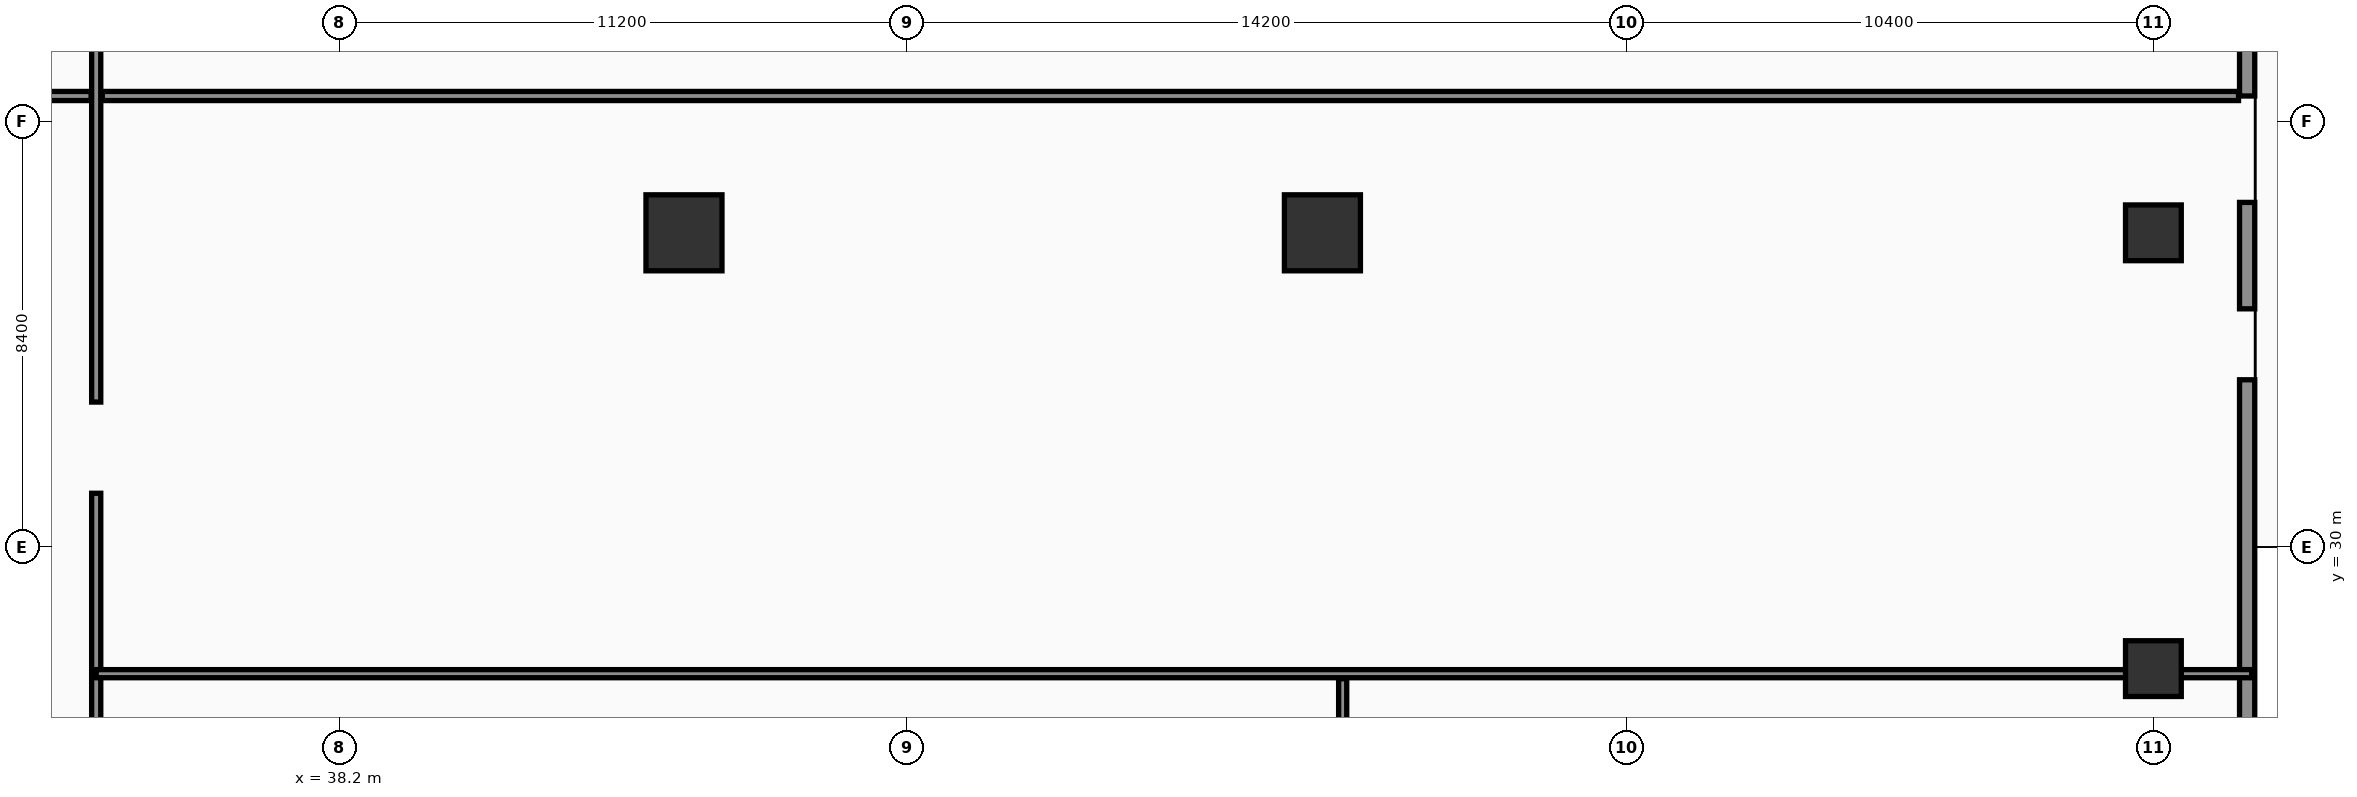
"""IFC4 building model, lengths in metres.
Left out: names, types, materials, properties, quantities, classifications, styles, units other than length and angle.
Written with IfcOpenShell. Run it as: python <this file> out.ifc"""

import sys

from ifc_helpers import new_model, si_unit, direction, frame, frame_2d, origin, origin_2d, place, context, subcontext, project, spatial, rectangle, hollow_rectangle, extrude, element, fill, save


model = new_model("IFC4")
c1 = context("Model", 3, precision=1e-05, world=origin(), true_north=direction((0.0, 1.0)))
c2 = subcontext(c1, "Body", "Model", "MODEL_VIEW")
j1 = project(units=[si_unit("LENGTHUNIT", "METRE"), si_unit("PLANEANGLEUNIT", "RADIAN")], contexts=[c1])
p1 = place(None, origin())
s1 = spatial("IfcSite", under=j1, at=p1, CompositionType="ELEMENT")
p2 = place(p1, origin())
s2 = spatial("IfcBuilding", under=s1, at=p2, CompositionType="ELEMENT")
p3 = place(p2, frame((0.0, 0.0, 17.0)))
s3 = spatial("IfcBuildingStorey", under=s2, at=p3, CompositionType="ELEMENT", Elevation=17.0)
for number, where, z_axis, x_axis in (
    (1, (74.0, 27.6, 0.0), (0.0, 0.0, 1.0), (1.0, 0.0, 0.0)),
    (2, (74.0, 36.2, 0.0), (0.0, 0.0, 1.0), (1.0, 0.0, 0.0)),
):
    element("IfcColumn", number, at=place(p3, frame(where, z_axis=z_axis, x_axis=x_axis)), inside=s3, PredefinedType="COLUMN", context=c2, shape_type="SweptSolid", body=[
        extrude(hollow_rectangle(XDim=1.1, YDim=1.1, WallThickness=0.045, at=origin_2d()), origin(), (0.0, 0.0, 1.0), 4.55),
    ])
for number, where, z_axis, x_axis in (
    (3, (45.0, 36.2, 0.0), (0.0, 0.0, 1.0), (1.0, 0.0, 0.0)),
    (4, (57.6, 36.2, 0.0), (0.0, 0.0, 1.0), (1.0, 0.0, 0.0)),
):
    element("IfcColumn", number, at=place(p3, frame(where, z_axis=z_axis, x_axis=x_axis)), inside=s3, PredefinedType="COLUMN", context=c2, shape_type="SweptSolid", body=[
        extrude(rectangle(XDim=1.5, YDim=1.5, at=origin_2d()), origin(), (0.0, 0.0, 1.0), 4.55),
    ])
p4 = place(p3, frame((75.85, 2.3, 0.0), z_axis=(0.0, 0.0, 1.0), x_axis=(0.0, 1.0, 0.0)))
e5 = element("IfcWall", 5, at=p4, inside=s3, PredefinedType="SOLIDWALL", context=c2, shape_type="SweptSolid", body=[
    extrude(rectangle(XDim=50.9, YDim=0.3, at=frame_2d((25.45, 0.0))), origin(), (0.0, 0.0, 1.0), 4.55),
])
p5 = place(p4, frame((10.0, 0.0, 0.0)))
e6 = element("IfcOpeningElement", 6, at=p5, cuts=e5, PredefinedType="OPENING", context=c2, shape_type="SweptSolid", body=[
    extrude(rectangle(XDim=1.4, YDim=2.25, at=frame_2d((0.7, 1.125))), frame((0.0, 0.16, 0.0), z_axis=(0.0, -1.0, 0.0), x_axis=(1.0, 0.0, 0.0)), (0.0, 0.0, 1.0), 0.32),
])
p6 = place(p4, frame((31.0, 0.0, 0.0)))
e7 = element("IfcOpeningElement", 7, at=p6, cuts=e5, PredefinedType="OPENING", context=c2, shape_type="SweptSolid", body=[
    extrude(rectangle(XDim=1.4, YDim=2.25, at=frame_2d((0.7, 1.125))), frame((0.0, 0.16, 0.0), z_axis=(0.0, -1.0, 0.0), x_axis=(1.0, 0.0, 0.0)), (0.0, 0.0, 1.0), 0.32),
])
p7 = place(p4, frame((16.5, 0.0, 0.85)))
e8 = element("IfcOpeningElement", 8, at=p7, cuts=e5, PredefinedType="OPENING", context=c2, shape_type="SweptSolid", body=[
    extrude(rectangle(XDim=2.1, YDim=2.1, at=frame_2d((1.05, 1.05))), frame((0.0, 0.16, 0.0), z_axis=(0.0, -1.0, 0.0), x_axis=(1.0, 0.0, 0.0)), (0.0, 0.0, 1.0), 0.32),
])
p8 = place(p4, frame((34.5, 0.0, 0.85)))
e9 = element("IfcOpeningElement", 9, at=p8, cuts=e5, PredefinedType="OPENING", context=c2, shape_type="SweptSolid", body=[
    extrude(rectangle(XDim=2.1, YDim=2.1, at=frame_2d((1.05, 1.05))), frame((0.0, 0.16, 0.0), z_axis=(0.0, -1.0, 0.0), x_axis=(1.0, 0.0, 0.0)), (0.0, 0.0, 1.0), 0.32),
])
p9 = place(p3, frame((15.2, 38.9, 0.0), z_axis=(0.0, 0.0, 1.0), x_axis=(1.0, 0.0, 0.0)))
e10 = element("IfcWall", 10, at=p9, inside=s3, PredefinedType="PARTITIONING", context=c2, shape_type="SweptSolid", body=[
    extrude(rectangle(XDim=18.1, YDim=0.18, at=frame_2d((9.05, 0.0))), origin(), (0.0, 0.0, 1.0), 3.75),
])
p10 = place(p9, frame((2.2, 0.0, 0.0)))
e11 = element("IfcOpeningElement", 11, at=p10, cuts=e10, PredefinedType="OPENING", context=c2, shape_type="SweptSolid", body=[
    extrude(rectangle(XDim=1.02, YDim=2.2, at=frame_2d((0.51, 1.1))), frame((0.0, 0.1, 0.0), z_axis=(0.0, -1.0, 0.0), x_axis=(1.0, 0.0, 0.0)), (0.0, 0.0, 1.0), 0.2),
])
p11 = place(p9, frame((8.2, 0.0, 0.0)))
e12 = element("IfcOpeningElement", 12, at=p11, cuts=e10, PredefinedType="OPENING", context=c2, shape_type="SweptSolid", body=[
    extrude(rectangle(XDim=1.02, YDim=2.2, at=frame_2d((0.51, 1.1))), frame((0.0, 0.1, 0.0), z_axis=(0.0, -1.0, 0.0), x_axis=(1.0, 0.0, 0.0)), (0.0, 0.0, 1.0), 0.2),
])
p12 = place(p9, frame((14.2, 0.0, 0.0)))
e13 = element("IfcOpeningElement", 13, at=p12, cuts=e10, PredefinedType="OPENING", context=c2, shape_type="SweptSolid", body=[
    extrude(rectangle(XDim=1.02, YDim=2.2, at=frame_2d((0.51, 1.1))), frame((0.0, 0.1, 0.0), z_axis=(0.0, -1.0, 0.0), x_axis=(1.0, 0.0, 0.0)), (0.0, 0.0, 1.0), 0.2),
])
p13 = place(p3, frame((58.0, 0.06, 0.0), z_axis=(0.0, 0.0, 1.0), x_axis=(0.0, 1.0, 0.0)))
e14 = element("IfcWall", 14, at=p13, inside=s3, PredefinedType="PARTITIONING", context=c2, shape_type="SweptSolid", body=[
    extrude(rectangle(XDim=27.34, YDim=0.16, at=frame_2d((13.67, 0.0))), origin(), (0.0, 0.0, 1.0), 3.05),
])
p14 = place(p13, frame((10.0, 0.0, 0.0)))
e15 = element("IfcOpeningElement", 15, at=p14, cuts=e14, PredefinedType="OPENING", context=c2, shape_type="SweptSolid", body=[
    extrude(rectangle(XDim=0.98, YDim=2.15, at=frame_2d((0.49, 1.075))), frame((0.0, 0.09, 0.0), z_axis=(0.0, -1.0, 0.0), x_axis=(1.0, 0.0, 0.0)), (0.0, 0.0, 1.0), 0.18),
])
p15 = place(p3, frame((33.4, 0.06, 0.0), z_axis=(0.0, 0.0, 1.0), x_axis=(0.0, 1.0, 0.0)))
e16 = element("IfcWall", 16, at=p15, inside=s3, PredefinedType="PARTITIONING", context=c2, shape_type="SweptSolid", body=[
    extrude(rectangle(XDim=55.38, YDim=0.18, at=frame_2d((27.69, 0.0))), origin(), (0.0, 0.0, 1.0), 3.75),
])
p16 = place(p15, frame((18.5, 0.0, 0.0)))
e17 = element("IfcOpeningElement", 17, at=p16, cuts=e16, PredefinedType="OPENING", context=c2, shape_type="SweptSolid", body=[
    extrude(rectangle(XDim=1.8, YDim=2.4, at=frame_2d((0.9, 1.2))), frame((0.0, 0.1, 0.0), z_axis=(0.0, -1.0, 0.0), x_axis=(1.0, 0.0, 0.0)), (0.0, 0.0, 1.0), 0.2),
])
p17 = place(p15, frame((31.0, 0.0, 0.0)))
e18 = element("IfcOpeningElement", 18, at=p17, cuts=e16, PredefinedType="OPENING", context=c2, shape_type="SweptSolid", body=[
    extrude(rectangle(XDim=1.8, YDim=2.4, at=frame_2d((0.9, 1.2))), frame((0.0, 0.1, 0.0), z_axis=(0.0, -1.0, 0.0), x_axis=(1.0, 0.0, 0.0)), (0.0, 0.0, 1.0), 0.2),
])
p18 = place(p3, frame((33.4, 27.5, 0.0), z_axis=(0.0, 0.0, 1.0), x_axis=(1.0, 0.0, 0.0)))
e19 = element("IfcWall", 19, at=p18, inside=s3, PredefinedType="PARTITIONING", context=c2, shape_type="SweptSolid", body=[
    extrude(rectangle(XDim=42.54, YDim=0.16, at=frame_2d((21.27, 0.0))), origin(), (0.0, 0.0, 1.0), 3.05),
])
p19 = place(p3, frame((33.52, 38.9, 0.0), z_axis=(0.0, 0.0, 1.0), x_axis=(1.0, 0.0, 0.0)))
e20 = element("IfcWall", 20, at=p19, inside=s3, PredefinedType="PARTITIONING", context=c2, shape_type="SweptSolid", body=[
    extrude(rectangle(XDim=42.16, YDim=0.18, at=frame_2d((21.08, 0.0))), origin(), (0.0, 0.0, 1.0), 3.75),
])
p20 = place(p6, origin())
e21 = element("IfcDoor", 21, at=p20, inside=s3, OperationType="SINGLE_SWING_LEFT", PredefinedType="DOOR", context=c2, shape_type="SweptSolid", body=[
    extrude(rectangle(XDim=1.4, YDim=2.25, at=frame_2d((0.7, 1.125))), frame((0.0, 0.025, 0.0), z_axis=(0.0, -1.0, 0.0), x_axis=(1.0, 0.0, 0.0)), (0.0, 0.0, 1.0), 0.05),
])
fill(e7, e21)
p21 = place(p8, origin())
e22 = element("IfcWindow", 22, at=p21, inside=s3, PartitioningType="SINGLE_PANEL", PredefinedType="WINDOW", context=c2, shape_type="SweptSolid", body=[
    extrude(rectangle(XDim=2.1, YDim=2.1, at=frame_2d((1.05, 1.05))), frame((0.0, 0.03, 0.0), z_axis=(0.0, -1.0, 0.0), x_axis=(1.0, 0.0, 0.0)), (0.0, 0.0, 1.0), 0.06),
])
fill(e9, e22)
p22 = place(p17, origin())
e23 = element("IfcDoor", 23, at=p22, inside=s3, OperationType="SINGLE_SWING_RIGHT", PredefinedType="DOOR", context=c2, shape_type="SweptSolid", body=[
    extrude(rectangle(XDim=1.8, YDim=2.4, at=frame_2d((0.9, 1.2))), frame((0.0, 0.025, 0.0), z_axis=(0.0, -1.0, 0.0), x_axis=(1.0, 0.0, 0.0)), (0.0, 0.0, 1.0), 0.05),
])
fill(e18, e23)
save(model, sys.argv[1])
